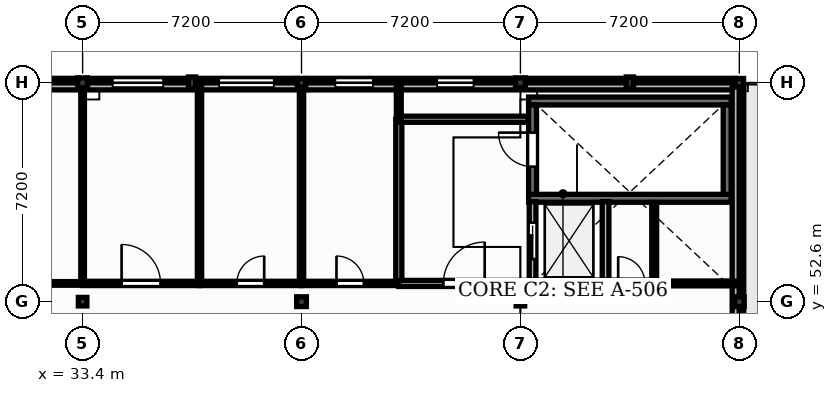
"""IFC4 building model, lengths in metres.
Left out: names, types, materials, properties, quantities, classifications, styles, units other than length and angle.
Written with IfcOpenShell. Run it as: python <this file> out.ifc"""

import sys

from ifc_helpers import new_model, si_unit, direction, frame, frame_2d, origin, origin_2d, place, context, subcontext, project, spatial, polyline, rectangle, outline, extrude, element, fill, save


model = new_model("IFC4")
c1 = context("Model", 3, precision=1e-05, world=origin(), true_north=direction((0.0, 1.0)))
c2 = subcontext(c1, "Body", "Model", "MODEL_VIEW")
j1 = project(units=[si_unit("LENGTHUNIT", "METRE"), si_unit("PLANEANGLEUNIT", "RADIAN")], contexts=[c1])
p1 = place(None, origin())
s1 = spatial("IfcSite", under=j1, at=p1, CompositionType="ELEMENT")
p2 = place(p1, origin())
s2 = spatial("IfcBuilding", under=s1, at=p2, CompositionType="ELEMENT")
p3 = place(p2, frame((0.0, 0.0, 17.4)))
s3 = spatial("IfcBuildingStorey", under=s2, at=p3, CompositionType="ELEMENT", Elevation=17.4)
p4 = place(p3, frame((33.4, 52.6, 0.0), z_axis=(0.0, 0.0, 1.0), x_axis=(1.0, 0.0, 0.0)))
e1 = element("IfcColumn", 1, at=p4, inside=s3, PredefinedType="COLUMN", context=c2, shape_type="SweptSolid", body=[
    extrude(rectangle(XDim=0.28, YDim=0.28, at=origin_2d()), origin(), (0.0, 0.0, 1.0), 3.95),
])
for number, where, z_axis, x_axis in (
    (2, (33.4, 59.8, 0.0), (0.0, 0.0, 1.0), (1.0, 0.0, 0.0)),
    (3, (40.6, 52.6, 0.0), (0.0, 0.0, 1.0), (1.0, 0.0, 0.0)),
):
    element("IfcColumn", number, at=place(p3, frame(where, z_axis=z_axis, x_axis=x_axis)), inside=s3, PredefinedType="COLUMN", context=c2, shape_type="SweptSolid", body=[
        extrude(rectangle(XDim=0.32, YDim=0.32, at=origin_2d()), origin(), (0.0, 0.0, 1.0), 3.95),
    ])
for number, where, z_axis, x_axis in (
    (4, (40.6, 59.8, 0.0), (0.0, 0.0, 1.0), (1.0, 0.0, 0.0)),
    (5, (47.8, 52.6, 0.0), (0.0, 0.0, 1.0), (1.0, 0.0, 0.0)),
):
    element("IfcColumn", number, at=place(p3, frame(where, z_axis=z_axis, x_axis=x_axis)), inside=s3, PredefinedType="COLUMN", context=c2, shape_type="SweptSolid", body=[
        extrude(rectangle(XDim=0.28, YDim=0.28, at=origin_2d()), origin(), (0.0, 0.0, 1.0), 3.95),
    ])
for number, where, z_axis, x_axis in (
    (6, (47.8, 59.8, 0.0), (0.0, 0.0, 1.0), (1.0, 0.0, 0.0)),
    (7, (55.0, 52.6, 0.0), (0.0, 0.0, 1.0), (1.0, 0.0, 0.0)),
):
    element("IfcColumn", number, at=place(p3, frame(where, z_axis=z_axis, x_axis=x_axis)), inside=s3, PredefinedType="COLUMN", context=c2, shape_type="SweptSolid", body=[
        extrude(rectangle(XDim=0.32, YDim=0.32, at=origin_2d()), origin(), (0.0, 0.0, 1.0), 3.95),
    ])
p5 = place(p3, frame((55.0, 59.8, 0.0), z_axis=(0.0, 0.0, 1.0), x_axis=(1.0, 0.0, 0.0)))
e8 = element("IfcColumn", 8, at=p5, inside=s3, PredefinedType="COLUMN", context=c2, shape_type="SweptSolid", body=[
    extrude(rectangle(XDim=0.28, YDim=0.28, at=origin_2d()), origin(), (0.0, 0.0, 1.0), 3.95),
])
for number, where, z_axis, x_axis in (
    (9, (37.0, 59.8, 0.0), (0.0, 0.0, 1.0), (1.0, 0.0, 0.0)),
    (10, (51.4, 59.8, 0.0), (0.0, 0.0, 1.0), (1.0, 0.0, 0.0)),
):
    element("IfcColumn", number, at=place(p3, frame(where, z_axis=z_axis, x_axis=x_axis)), inside=s3, PredefinedType="PILASTER", context=c2, shape_type="SweptSolid", body=[
        extrude(rectangle(XDim=0.24, YDim=0.38, at=origin_2d()), origin(), (0.0, 0.0, 1.0), 3.95),
    ])
p6 = place(p3, frame((26.34, 59.8, 0.0), z_axis=(0.0, 0.0, 1.0), x_axis=(1.0, 0.0, 0.0)))
e11 = element("IfcWall", 11, at=p6, inside=s3, PredefinedType="SOLIDWALL", context=c2, shape_type="SweptSolid", body=[
    extrude(rectangle(XDim=6.9, YDim=0.29, at=frame_2d((3.45, 0.0))), origin(), (0.0, 0.0, 1.0), 3.49),
])
p7 = place(p6, frame((0.69, 0.0, 1.35)))
e12 = element("IfcOpeningElement", 12, at=p7, cuts=e11, PredefinedType="OPENING", context=c2, shape_type="SweptSolid", body=[
    extrude(rectangle(XDim=1.45, YDim=1.4, at=frame_2d((0.725, 0.7))), frame((0.0, 0.155, 0.0), z_axis=(0.0, -1.0, 0.0), x_axis=(1.0, 0.0, 0.0)), (0.0, 0.0, 1.0), 0.31),
])
p8 = place(p6, frame((4.12, 0.0, 1.35)))
e13 = element("IfcOpeningElement", 13, at=p8, cuts=e11, PredefinedType="OPENING", context=c2, shape_type="SweptSolid", body=[
    extrude(rectangle(XDim=1.25, YDim=1.4, at=frame_2d((0.625, 0.7))), frame((0.0, 0.155, 0.0), z_axis=(0.0, -1.0, 0.0), x_axis=(1.0, 0.0, 0.0)), (0.0, 0.0, 1.0), 0.31),
])
p9 = place(p3, frame((33.56, 59.8, 0.0), z_axis=(0.0, 0.0, 1.0), x_axis=(1.0, 0.0, 0.0)))
e14 = element("IfcWall", 14, at=p9, inside=s3, PredefinedType="SOLIDWALL", context=c2, shape_type="SweptSolid", body=[
    extrude(rectangle(XDim=3.32, YDim=0.29, at=frame_2d((1.66, 0.0))), origin(), (0.0, 0.0, 1.0), 3.49),
])
p10 = place(p9, frame((0.83, 0.0, 1.0)))
e15 = element("IfcOpeningElement", 15, at=p10, cuts=e14, PredefinedType="OPENING", context=c2, shape_type="SweptSolid", body=[
    extrude(rectangle(XDim=1.66, YDim=1.8, at=frame_2d((0.83, 0.9))), frame((0.0, 0.155, 0.0), z_axis=(0.0, -1.0, 0.0), x_axis=(1.0, 0.0, 0.0)), (0.0, 0.0, 1.0), 0.31),
])
p11 = place(p3, frame((37.12, 59.8, 0.0), z_axis=(0.0, 0.0, 1.0), x_axis=(1.0, 0.0, 0.0)))
e16 = element("IfcWall", 16, at=p11, inside=s3, PredefinedType="SOLIDWALL", context=c2, shape_type="SweptSolid", body=[
    extrude(rectangle(XDim=3.34, YDim=0.29, at=frame_2d((1.67, 0.0))), origin(), (0.0, 0.0, 1.0), 3.49),
])
p12 = place(p11, frame((0.77, 0.0, 1.0)))
e17 = element("IfcOpeningElement", 17, at=p12, cuts=e16, PredefinedType="OPENING", context=c2, shape_type="SweptSolid", body=[
    extrude(rectangle(XDim=1.8, YDim=1.8, at=frame_2d((0.9, 0.9))), frame((0.0, 0.155, 0.0), z_axis=(0.0, -1.0, 0.0), x_axis=(1.0, 0.0, 0.0)), (0.0, 0.0, 1.0), 0.31),
])
p13 = place(p3, frame((40.74, 59.8, 0.0), z_axis=(0.0, 0.0, 1.0), x_axis=(1.0, 0.0, 0.0)))
e18 = element("IfcWall", 18, at=p13, inside=s3, PredefinedType="SOLIDWALL", context=c2, shape_type="SweptSolid", body=[
    extrude(rectangle(XDim=6.9, YDim=0.29, at=frame_2d((3.45, 0.0))), origin(), (0.0, 0.0, 1.0), 3.49),
])
p14 = place(p13, frame((0.97, 0.0, 1.0)))
e19 = element("IfcOpeningElement", 19, at=p14, cuts=e18, PredefinedType="OPENING", context=c2, shape_type="SweptSolid", body=[
    extrude(rectangle(XDim=1.24, YDim=1.8, at=frame_2d((0.62, 0.9))), frame((0.0, 0.155, 0.0), z_axis=(0.0, -1.0, 0.0), x_axis=(1.0, 0.0, 0.0)), (0.0, 0.0, 1.0), 0.31),
])
p15 = place(p13, frame((4.32, 0.0, 1.0)))
e20 = element("IfcOpeningElement", 20, at=p15, cuts=e18, PredefinedType="OPENING", context=c2, shape_type="SweptSolid", body=[
    extrude(rectangle(XDim=1.2, YDim=1.95, at=frame_2d((0.6, 0.975))), frame((0.0, 0.155, 0.0), z_axis=(0.0, -1.0, 0.0), x_axis=(1.0, 0.0, 0.0)), (0.0, 0.0, 1.0), 0.31),
])
p16 = place(p3, frame((55.0, 45.54, 0.0), z_axis=(0.0, 0.0, 1.0), x_axis=(0.0, 1.0, 0.0)))
e21 = element("IfcWall", 21, at=p16, inside=s3, PredefinedType="SOLIDWALL", context=c2, shape_type="SweptSolid", body=[
    extrude(rectangle(XDim=6.9, YDim=0.29, at=frame_2d((3.45, 0.0))), origin(), (0.0, 0.0, 1.0), 3.49),
])
p17 = place(p16, frame((2.85, 0.0, 0.0)))
e22 = element("IfcOpeningElement", 22, at=p17, cuts=e21, PredefinedType="OPENING", context=c2, shape_type="SweptSolid", body=[
    extrude(rectangle(XDim=1.2, YDim=2.25, at=frame_2d((0.6, 1.125))), frame((0.0, 0.155, 0.0), z_axis=(0.0, -1.0, 0.0), x_axis=(1.0, 0.0, 0.0)), (0.0, 0.0, 1.0), 0.31),
])
p18 = place(p16, frame((0.825, 0.0, 1.05)))
e23 = element("IfcOpeningElement", 23, at=p18, cuts=e21, PredefinedType="OPENING", context=c2, shape_type="SweptSolid", body=[
    extrude(rectangle(XDim=1.26, YDim=1.65, at=frame_2d((0.63, 0.825))), frame((0.0, 0.155, 0.0), z_axis=(0.0, -1.0, 0.0), x_axis=(1.0, 0.0, 0.0)), (0.0, 0.0, 1.0), 0.31),
])
p19 = place(p3, frame((47.96, 59.8, 0.0), z_axis=(0.0, 0.0, 1.0), x_axis=(1.0, 0.0, 0.0)))
e24 = element("IfcWall", 24, at=p19, inside=s3, PredefinedType="SOLIDWALL", context=c2, shape_type="SweptSolid", body=[
    extrude(rectangle(XDim=3.32, YDim=0.29, at=frame_2d((1.66, 0.0))), origin(), (0.0, 0.0, 1.0), 3.49),
])
p20 = place(p3, frame((51.52, 59.8, 0.0), z_axis=(0.0, 0.0, 1.0), x_axis=(1.0, 0.0, 0.0)))
e25 = element("IfcWall", 25, at=p20, inside=s3, PredefinedType="SOLIDWALL", context=c2, shape_type="SweptSolid", body=[
    extrude(rectangle(XDim=3.34, YDim=0.29, at=frame_2d((1.67, 0.0))), origin(), (0.0, 0.0, 1.0), 3.49),
])
p21 = place(p3, frame((55.0, 52.76, 0.0), z_axis=(0.0, 0.0, 1.0), x_axis=(0.0, 1.0, 0.0)))
e26 = element("IfcWall", 26, at=p21, inside=s3, PredefinedType="SOLIDWALL", context=c2, shape_type="SweptSolid", body=[
    extrude(rectangle(XDim=6.9, YDim=0.29, at=frame_2d((3.45, 0.0))), origin(), (0.0, 0.0, 1.0), 3.49),
])
p22 = place(p3, frame((4.6, 59.68, 4.2), z_axis=(0.0, 0.0, 1.0), x_axis=(1.0, 0.0, 0.0)))
e27 = element("IfcWall", 27, at=p22, inside=s3, PredefinedType="PARAPET", context=c2, shape_type="SweptSolid", body=[
    extrude(outline(polyline([(0.0, 0.0), (50.4, 0.0), (50.4, 0.65), (39.312, 0.925), (39.312, 0.65), (32.256, 1.2), (32.256, 0.925), (18.144, 1.2), (18.144, 0.925), (11.088, 0.925), (11.088, 0.65), (0.0, 0.65), (0.0, 0.0)])), frame((0.0, 0.115, 0.0), z_axis=(0.0, -1.0, 0.0), x_axis=(1.0, 0.0, 0.0)), (0.0, 0.0, 1.0), 0.23),
])
p23 = place(p3, frame((54.88, 45.52, 4.2), z_axis=(0.0, 0.0, 1.0), x_axis=(0.0, 1.0, 0.0)))
e28 = element("IfcWall", 28, at=p23, inside=s3, PredefinedType="PARAPET", context=c2, shape_type="SweptSolid", body=[
    extrude(outline(polyline([(0.0, 0.0), (14.16, 0.0), (14.16, 0.6), (11.045, 0.85), (11.045, 0.6), (9.062, 1.1), (9.062, 0.85), (5.098, 1.1), (5.098, 0.85), (3.115, 0.85), (3.115, 0.6), (0.0, 0.6), (0.0, 0.0)])), frame((0.0, 0.115, 0.0), z_axis=(0.0, -1.0, 0.0), x_axis=(1.0, 0.0, 0.0)), (0.0, 0.0, 1.0), 0.23),
])
for number, where, z_axis, x_axis in (
    (29, (48.07, 56.0, 0.0), (0.0, 0.0, 1.0), (1.0, 0.0, 0.0)),
    (30, (48.07, 59.2, 0.0), (0.0, 0.0, 1.0), (1.0, 0.0, 0.0)),
):
    element("IfcWall", number, at=place(p3, frame(where, z_axis=z_axis, x_axis=x_axis)), inside=s3, PredefinedType="SHEAR", context=c2, shape_type="SweptSolid", body=[
        extrude(rectangle(XDim=6.66, YDim=0.26, at=frame_2d((3.33, 0.0))), origin(), (0.0, 0.0, 1.0), 3.95),
    ])
p24 = place(p3, frame((48.2, 56.13, 0.0), z_axis=(0.0, 0.0, 1.0), x_axis=(0.0, 1.0, 0.0)))
e31 = element("IfcWall", 31, at=p24, inside=s3, PredefinedType="SHEAR", context=c2, shape_type="SweptSolid", body=[
    extrude(rectangle(XDim=2.94, YDim=0.26, at=frame_2d((1.47, 0.0))), origin(), (0.0, 0.0, 1.0), 3.95),
])
p25 = place(p24, frame((0.91, 0.0, 0.0)))
e32 = element("IfcOpeningElement", 32, at=p25, cuts=e31, PredefinedType="OPENING", context=c2, shape_type="SweptSolid", body=[
    extrude(rectangle(XDim=1.12, YDim=2.1, at=frame_2d((0.56, 1.05))), frame((0.0, 0.14, 0.0), z_axis=(0.0, -1.0, 0.0), x_axis=(1.0, 0.0, 0.0)), (0.0, 0.0, 1.0), 0.28),
])
p26 = place(p3, frame((54.6, 56.13, 0.0), z_axis=(0.0, 0.0, 1.0), x_axis=(0.0, 1.0, 0.0)))
e33 = element("IfcWall", 33, at=p26, inside=s3, PredefinedType="SHEAR", context=c2, shape_type="SweptSolid", body=[
    extrude(rectangle(XDim=2.94, YDim=0.26, at=frame_2d((1.47, 0.0))), origin(), (0.0, 0.0, 1.0), 3.95),
])
p27 = place(p3, frame((48.2, 53.2, 0.0), z_axis=(0.0, 0.0, 1.0), x_axis=(1.0, 0.0, 0.0)))
e34 = element("IfcWall", 34, at=p27, inside=s3, PredefinedType="SOLIDWALL", context=c2, shape_type="SweptSolid", body=[
    extrude(rectangle(XDim=2.4, YDim=0.22, at=frame_2d((1.2, 0.0))), origin(), (0.0, 0.0, 1.0), 3.95),
])
p28 = place(p3, frame((48.2, 53.31, 0.0), z_axis=(0.0, 0.0, 1.0), x_axis=(0.0, 1.0, 0.0)))
e35 = element("IfcWall", 35, at=p28, inside=s3, PredefinedType="SOLIDWALL", context=c2, shape_type="SweptSolid", body=[
    extrude(rectangle(XDim=2.58, YDim=0.22, at=frame_2d((1.29, 0.0))), origin(), (0.0, 0.0, 1.0), 3.95),
])
p29 = place(p28, frame((0.69, 0.0, 0.0)))
e36 = element("IfcOpeningElement", 36, at=p29, cuts=e35, PredefinedType="OPENING", context=c2, shape_type="SweptSolid", body=[
    extrude(rectangle(XDim=1.2, YDim=2.15, at=frame_2d((0.6, 1.075))), frame((0.0, 0.12, 0.0), z_axis=(0.0, -1.0, 0.0), x_axis=(1.0, 0.0, 0.0)), (0.0, 0.0, 1.0), 0.24),
])
p30 = place(p3, frame((50.6, 53.31, 0.0), z_axis=(0.0, 0.0, 1.0), x_axis=(0.0, 1.0, 0.0)))
e37 = element("IfcWall", 37, at=p30, inside=s3, PredefinedType="SOLIDWALL", context=c2, shape_type="SweptSolid", body=[
    extrude(rectangle(XDim=2.58, YDim=0.22, at=frame_2d((1.29, 0.0))), origin(), (0.0, 0.0, 1.0), 3.95),
])
p31 = place(p3, frame((29.05, 53.2, 0.0), z_axis=(0.0, 0.0, 1.0), x_axis=(1.0, 0.0, 0.0)))
e38 = element("IfcWall", 38, at=p31, inside=s3, PredefinedType="PLUMBINGWALL", context=c2, shape_type="SweptSolid", body=[
    extrude(rectangle(XDim=4.35, YDim=0.12, at=frame_2d((2.175, 0.0))), origin(), (0.0, 0.0, 1.0), 3.93),
])
p32 = place(p31, frame((1.725, 0.0, 0.0)))
e39 = element("IfcOpeningElement", 39, at=p32, cuts=e38, PredefinedType="OPENING", context=c2, shape_type="SweptSolid", body=[
    extrude(rectangle(XDim=0.9, YDim=2.1, at=frame_2d((0.45, 1.05))), frame((0.0, 0.07, 0.0), z_axis=(0.0, -1.0, 0.0), x_axis=(1.0, 0.0, 0.0)), (0.0, 0.0, 1.0), 0.14),
])
p33 = place(p3, frame((33.4, 53.27, 0.0), z_axis=(0.0, 0.0, 1.0), x_axis=(0.0, 1.0, 0.0)))
e40 = element("IfcWall", 40, at=p33, inside=s3, PredefinedType="PLUMBINGWALL", context=c2, shape_type="SweptSolid", body=[
    extrude(rectangle(XDim=6.37, YDim=0.12, at=frame_2d((3.185, 0.0))), origin(), (0.0, 0.0, 1.0), 3.49),
])
p34 = place(p3, frame((33.4, 53.2, 0.0), z_axis=(0.0, 0.0, 1.0), x_axis=(1.0, 0.0, 0.0)))
e41 = element("IfcWall", 41, at=p34, inside=s3, PredefinedType="PARTITIONING", context=c2, shape_type="SweptSolid", body=[
    extrude(rectangle(XDim=3.845, YDim=0.14, at=frame_2d((1.923, 0.0))), origin(), (0.0, 0.0, 1.0), 3.93),
])
p35 = place(p34, frame((1.282, 0.0, 0.0)))
e42 = element("IfcOpeningElement", 42, at=p35, cuts=e41, PredefinedType="OPENING", context=c2, shape_type="SweptSolid", body=[
    extrude(rectangle(XDim=1.28, YDim=2.2, at=frame_2d((0.64, 1.1))), frame((0.0, 0.08, 0.0), z_axis=(0.0, -1.0, 0.0), x_axis=(1.0, 0.0, 0.0)), (0.0, 0.0, 1.0), 0.16),
])
p36 = place(p3, frame((37.245, 53.27, 0.0), z_axis=(0.0, 0.0, 1.0), x_axis=(0.0, 1.0, 0.0)))
e43 = element("IfcWall", 43, at=p36, inside=s3, PredefinedType="PARTITIONING", context=c2, shape_type="SweptSolid", body=[
    extrude(rectangle(XDim=6.53, YDim=0.14, at=frame_2d((3.265, 0.0))), origin(), (0.0, 0.0, 1.0), 3.93),
])
p37 = place(p3, frame((37.245, 53.2, 0.0), z_axis=(0.0, 0.0, 1.0), x_axis=(1.0, 0.0, 0.0)))
e44 = element("IfcWall", 44, at=p37, inside=s3, PredefinedType="PARTITIONING", context=c2, shape_type="SweptSolid", body=[
    extrude(rectangle(XDim=3.355, YDim=0.14, at=frame_2d((1.677, 0.0))), origin(), (0.0, 0.0, 1.0), 3.93),
])
p38 = place(p37, frame((1.228, 0.0, 0.0)))
e45 = element("IfcOpeningElement", 45, at=p38, cuts=e44, PredefinedType="OPENING", context=c2, shape_type="SweptSolid", body=[
    extrude(rectangle(XDim=0.9, YDim=2.1, at=frame_2d((0.45, 1.05))), frame((0.0, 0.08, 0.0), z_axis=(0.0, -1.0, 0.0), x_axis=(1.0, 0.0, 0.0)), (0.0, 0.0, 1.0), 0.16),
])
p39 = place(p3, frame((40.6, 53.27, 0.0), z_axis=(0.0, 0.0, 1.0), x_axis=(0.0, 1.0, 0.0)))
e46 = element("IfcWall", 46, at=p39, inside=s3, PredefinedType="PARTITIONING", context=c2, shape_type="SweptSolid", body=[
    extrude(rectangle(XDim=6.39, YDim=0.14, at=frame_2d((3.195, 0.0))), origin(), (0.0, 0.0, 1.0), 3.49),
])
p40 = place(p3, frame((40.6, 53.2, 0.0), z_axis=(0.0, 0.0, 1.0), x_axis=(1.0, 0.0, 0.0)))
e47 = element("IfcWall", 47, at=p40, inside=s3, PredefinedType="PARTITIONING", context=c2, shape_type="SweptSolid", body=[
    extrude(rectangle(XDim=3.2, YDim=0.14, at=frame_2d((1.6, 0.0))), origin(), (0.0, 0.0, 1.0), 3.93),
])
p41 = place(p40, frame((1.15, 0.0, 0.0)))
e48 = element("IfcOpeningElement", 48, at=p41, cuts=e47, PredefinedType="OPENING", context=c2, shape_type="SweptSolid", body=[
    extrude(rectangle(XDim=0.9, YDim=2.1, at=frame_2d((0.45, 1.05))), frame((0.0, 0.08, 0.0), z_axis=(0.0, -1.0, 0.0), x_axis=(1.0, 0.0, 0.0)), (0.0, 0.0, 1.0), 0.16),
])
p42 = place(p3, frame((43.8, 53.27, 0.0), z_axis=(0.0, 0.0, 1.0), x_axis=(0.0, 1.0, 0.0)))
e49 = element("IfcWall", 49, at=p42, inside=s3, PredefinedType="PARTITIONING", context=c2, shape_type="SweptSolid", body=[
    extrude(rectangle(XDim=5.33, YDim=0.2, at=frame_2d((2.665, 0.0))), origin(), (0.0, 0.0, 1.0), 3.93),
])
p43 = place(p3, frame((43.8, 53.2, 0.0), z_axis=(0.0, 0.0, 1.0), x_axis=(1.0, 0.0, 0.0)))
e50 = element("IfcWall", 50, at=p43, inside=s3, PredefinedType="PARTITIONING", context=c2, shape_type="SweptSolid", body=[
    extrude(rectangle(XDim=4.29, YDim=0.2, at=frame_2d((2.145, 0.0))), origin(), (0.0, 0.0, 1.0), 3.93),
])
p44 = place(p43, frame((1.465, 0.0, 0.0)))
e51 = element("IfcOpeningElement", 51, at=p44, cuts=e50, PredefinedType="OPENING", context=c2, shape_type="SweptSolid", body=[
    extrude(rectangle(XDim=1.36, YDim=2.2, at=frame_2d((0.68, 1.1))), frame((0.0, 0.11, 0.0), z_axis=(0.0, -1.0, 0.0), x_axis=(1.0, 0.0, 0.0)), (0.0, 0.0, 1.0), 0.22),
])
p45 = place(p3, frame((50.71, 53.2, 0.0), z_axis=(0.0, 0.0, 1.0), x_axis=(1.0, 0.0, 0.0)))
e52 = element("IfcWall", 52, at=p45, inside=s3, PredefinedType="SOLIDWALL", context=c2, shape_type="SweptSolid", body=[
    extrude(rectangle(XDim=1.49, YDim=0.22, at=frame_2d((0.745, 0.0))), origin(), (0.0, 0.0, 1.0), 3.93),
])
p46 = place(p45, frame((0.305, 0.0, 0.0)))
e53 = element("IfcOpeningElement", 53, at=p46, cuts=e52, PredefinedType="OPENING", context=c2, shape_type="SweptSolid", body=[
    extrude(rectangle(XDim=0.88, YDim=2.05, at=frame_2d((0.44, 1.025))), frame((0.0, 0.12, 0.0), z_axis=(0.0, -1.0, 0.0), x_axis=(1.0, 0.0, 0.0)), (0.0, 0.0, 1.0), 0.24),
])
p47 = place(p3, frame((52.2, 53.27, 0.0), z_axis=(0.0, 0.0, 1.0), x_axis=(0.0, 1.0, 0.0)))
e54 = element("IfcWall", 54, at=p47, inside=s3, PredefinedType="PARTITIONING", context=c2, shape_type="SweptSolid", body=[
    extrude(rectangle(XDim=2.59, YDim=0.16, at=frame_2d((1.295, 0.0))), origin(), (0.0, 0.0, 1.0), 3.93),
])
p48 = place(p3, frame((48.06, 58.6, 0.0), z_axis=(0.0, 0.0, 1.0), x_axis=(-1.0, 0.0, 0.0)))
e55 = element("IfcWall", 55, at=p48, inside=s3, PredefinedType="PARTITIONING", context=c2, shape_type="SweptSolid", body=[
    extrude(rectangle(XDim=4.26, YDim=0.2, at=frame_2d((2.13, 0.0))), origin(), (0.0, 0.0, 1.0), 3.93),
])
p49 = place(p3, frame((55.0, 53.2, 0.0), z_axis=(0.0, 0.0, 1.0), x_axis=(-1.0, 0.0, 0.0)))
e56 = element("IfcWall", 56, at=p49, inside=s3, PredefinedType="PARTITIONING", context=c2, shape_type="SweptSolid", body=[
    extrude(rectangle(XDim=2.8, YDim=0.16, at=frame_2d((1.4, 0.0))), origin(), (0.0, 0.0, 1.0), 3.93),
])
p50 = place(p3, frame((43.8, 58.6, 0.0), z_axis=(0.0, 0.0, 1.0), x_axis=(0.0, 1.0, 0.0)))
e57 = element("IfcWall", 57, at=p50, inside=s3, PredefinedType="PARTITIONING", context=c2, shape_type="SweptSolid", body=[
    extrude(rectangle(XDim=1.2, YDim=0.16, at=frame_2d((0.6, 0.0))), origin(), (0.0, 0.0, 1.0), 3.93),
])
p51 = place(p10, origin())
e58 = element("IfcWindow", 58, at=p51, inside=s3, PartitioningType="DOUBLE_PANEL_VERTICAL", PredefinedType="WINDOW", context=c2, shape_type="SweptSolid", body=[
    extrude(rectangle(XDim=1.66, YDim=1.8, at=frame_2d((0.83, 0.9))), frame((0.0, 0.03, 0.0), z_axis=(0.0, -1.0, 0.0), x_axis=(1.0, 0.0, 0.0)), (0.0, 0.0, 1.0), 0.06),
])
fill(e15, e58)
p52 = place(p12, origin())
e59 = element("IfcWindow", 59, at=p52, inside=s3, PartitioningType="DOUBLE_PANEL_VERTICAL", PredefinedType="WINDOW", context=c2, shape_type="SweptSolid", body=[
    extrude(rectangle(XDim=1.8, YDim=1.8, at=frame_2d((0.9, 0.9))), frame((0.0, 0.03, 0.0), z_axis=(0.0, -1.0, 0.0), x_axis=(1.0, 0.0, 0.0)), (0.0, 0.0, 1.0), 0.06),
])
fill(e17, e59)
p53 = place(p14, origin())
e60 = element("IfcWindow", 60, at=p53, inside=s3, PartitioningType="SINGLE_PANEL", PredefinedType="WINDOW", context=c2, shape_type="SweptSolid", body=[
    extrude(rectangle(XDim=1.24, YDim=1.8, at=frame_2d((0.62, 0.9))), frame((0.0, 0.03, 0.0), z_axis=(0.0, -1.0, 0.0), x_axis=(1.0, 0.0, 0.0)), (0.0, 0.0, 1.0), 0.06),
])
fill(e19, e60)
p54 = place(p15, origin())
e61 = element("IfcWindow", 61, at=p54, inside=s3, PartitioningType="SINGLE_PANEL", PredefinedType="WINDOW", context=c2, shape_type="SweptSolid", body=[
    extrude(rectangle(XDim=1.2, YDim=1.95, at=frame_2d((0.6, 0.975))), frame((0.0, 0.03, 0.0), z_axis=(0.0, -1.0, 0.0), x_axis=(1.0, 0.0, 0.0)), (0.0, 0.0, 1.0), 0.06),
])
fill(e20, e61)
p55 = place(p29, origin())
e62 = element("IfcDoor", 62, at=p55, inside=s3, OperationType="SLIDING_TO_LEFT", PredefinedType="DOOR", context=c2, shape_type="SweptSolid", body=[
    extrude(rectangle(XDim=1.2, YDim=2.15, at=frame_2d((0.6, 1.075))), frame((0.0, 0.025, 0.0), z_axis=(0.0, -1.0, 0.0), x_axis=(1.0, 0.0, 0.0)), (0.0, 0.0, 1.0), 0.05),
])
fill(e36, e62)
p56 = place(p25, origin())
e63 = element("IfcDoor", 63, at=p56, inside=s3, OperationType="SINGLE_SWING_RIGHT", PredefinedType="DOOR", context=c2, shape_type="SweptSolid", body=[
    extrude(rectangle(XDim=1.12, YDim=2.1, at=frame_2d((0.56, 1.05))), frame((0.0, 0.025, 0.0), z_axis=(0.0, -1.0, 0.0), x_axis=(1.0, 0.0, 0.0)), (0.0, 0.0, 1.0), 0.05),
])
fill(e32, e63)
p57 = place(p44, origin())
e64 = element("IfcDoor", 64, at=p57, inside=s3, OperationType="SINGLE_SWING_RIGHT", PredefinedType="DOOR", context=c2, shape_type="SweptSolid", body=[
    extrude(rectangle(XDim=1.36, YDim=2.2, at=frame_2d((0.68, 1.1))), frame((0.0, 0.025, 0.0), z_axis=(0.0, -1.0, 0.0), x_axis=(1.0, 0.0, 0.0)), (0.0, 0.0, 1.0), 0.05),
])
fill(e51, e64)
p58 = place(p46, origin())
e65 = element("IfcDoor", 65, at=p58, inside=s3, OperationType="SINGLE_SWING_LEFT", PredefinedType="DOOR", context=c2, shape_type="SweptSolid", body=[
    extrude(rectangle(XDim=0.88, YDim=2.05, at=frame_2d((0.44, 1.025))), frame((0.0, 0.025, 0.0), z_axis=(0.0, -1.0, 0.0), x_axis=(1.0, 0.0, 0.0)), (0.0, 0.0, 1.0), 0.05),
])
fill(e53, e65)
p59 = place(p35, origin())
e66 = element("IfcDoor", 66, at=p59, inside=s3, OperationType="SINGLE_SWING_LEFT", PredefinedType="DOOR", context=c2, shape_type="SweptSolid", body=[
    extrude(rectangle(XDim=1.28, YDim=2.2, at=frame_2d((0.64, 1.1))), frame((0.0, 0.025, 0.0), z_axis=(0.0, -1.0, 0.0), x_axis=(1.0, 0.0, 0.0)), (0.0, 0.0, 1.0), 0.05),
])
fill(e42, e66)
p60 = place(p38, origin())
e67 = element("IfcDoor", 67, at=p60, inside=s3, OperationType="SINGLE_SWING_RIGHT", PredefinedType="DOOR", context=c2, shape_type="SweptSolid", body=[
    extrude(rectangle(XDim=0.9, YDim=2.1, at=frame_2d((0.45, 1.05))), frame((0.0, 0.025, 0.0), z_axis=(0.0, -1.0, 0.0), x_axis=(1.0, 0.0, 0.0)), (0.0, 0.0, 1.0), 0.05),
])
fill(e45, e67)
p61 = place(p41, origin())
e68 = element("IfcDoor", 68, at=p61, inside=s3, OperationType="SINGLE_SWING_LEFT", PredefinedType="DOOR", context=c2, shape_type="SweptSolid", body=[
    extrude(rectangle(XDim=0.9, YDim=2.1, at=frame_2d((0.45, 1.05))), frame((0.0, 0.025, 0.0), z_axis=(0.0, -1.0, 0.0), x_axis=(1.0, 0.0, 0.0)), (0.0, 0.0, 1.0), 0.05),
])
fill(e48, e68)
save(model, sys.argv[1])
